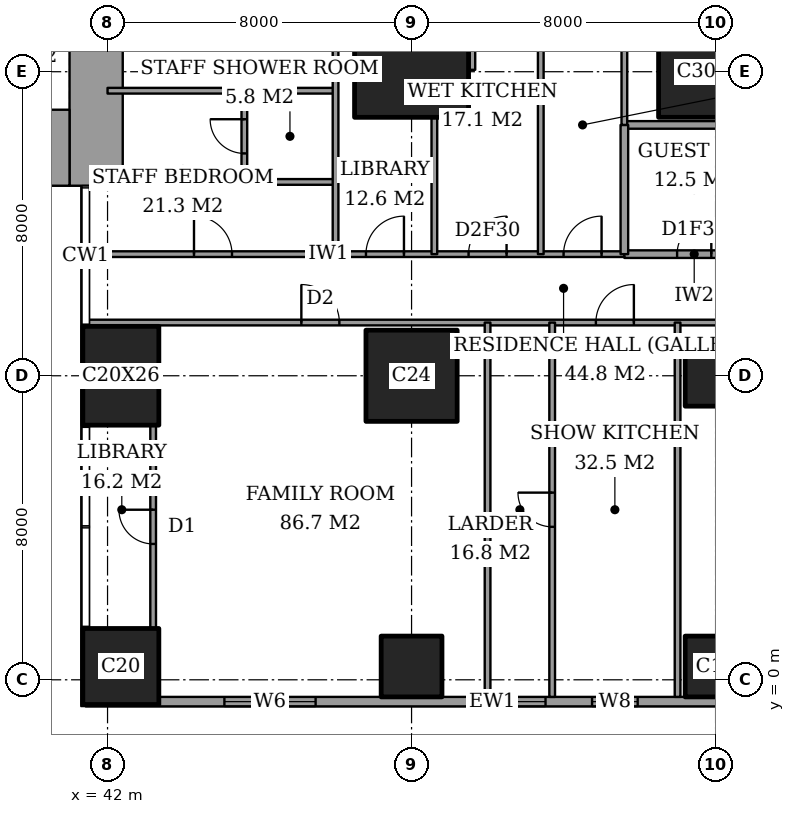
"""IFC4 building model, lengths in metres.
Left out: names, types, materials, properties, quantities, classifications, styles, units other than length and angle.
Written with IfcOpenShell. Run it as: python <this file> out.ifc"""

import sys

from ifc_helpers import new_model, si_unit, direction, frame, frame_2d, origin, origin_2d, place, context, subcontext, project, spatial, rectangle, extrude, element, fill, save


model = new_model("IFC4")
c1 = context("Model", 3, precision=1e-05, world=origin(), true_north=direction((0.0, 1.0)))
c2 = subcontext(c1, "Body", "Model", "MODEL_VIEW")
j1 = project(units=[si_unit("LENGTHUNIT", "METRE"), si_unit("PLANEANGLEUNIT", "RADIAN")], contexts=[c1])
p1 = place(None, origin())
s1 = spatial("IfcSite", under=j1, at=p1, CompositionType="ELEMENT")
p2 = place(p1, origin())
s2 = spatial("IfcBuilding", under=s1, at=p2, CompositionType="ELEMENT")
p3 = place(p2, frame((0.0, 0.0, 255.6)))
s3 = spatial("IfcBuildingStorey", under=s2, at=p3, CompositionType="ELEMENT", Elevation=255.6)
p4 = place(p3, frame((42.35, 0.35, 0.0), z_axis=(0.0, 0.0, 1.0), x_axis=(1.0, 0.0, 0.0)))
e1 = element("IfcColumn", 1, at=p4, inside=s3, PredefinedType="COLUMN", context=c2, shape_type="SweptSolid", body=[
    extrude(rectangle(XDim=2.0, YDim=2.0, at=origin_2d()), origin(), (0.0, 0.0, 1.0), 3.6),
])
p5 = place(p3, frame((42.35, 8.0, 0.0), z_axis=(0.0, 0.0, 1.0), x_axis=(1.0, 0.0, 0.0)))
e2 = element("IfcColumn", 2, at=p5, inside=s3, PredefinedType="COLUMN", context=c2, shape_type="SweptSolid", body=[
    extrude(rectangle(XDim=2.0, YDim=2.6, at=origin_2d()), origin(), (0.0, 0.0, 1.0), 3.6),
])
p6 = place(p3, frame((50.0, 0.35, 0.0), z_axis=(0.0, 0.0, 1.0), x_axis=(1.0, 0.0, 0.0)))
e3 = element("IfcColumn", 3, at=p6, inside=s3, PredefinedType="COLUMN", context=c2, shape_type="SweptSolid", body=[
    extrude(rectangle(XDim=1.6, YDim=1.6, at=origin_2d()), origin(), (0.0, 0.0, 1.0), 3.6),
])
p7 = place(p3, frame((50.0, 8.0, 0.0), z_axis=(0.0, 0.0, 1.0), x_axis=(1.0, 0.0, 0.0)))
e4 = element("IfcColumn", 4, at=p7, inside=s3, PredefinedType="COLUMN", context=c2, shape_type="SweptSolid", body=[
    extrude(rectangle(XDim=2.4, YDim=2.4, at=origin_2d()), origin(), (0.0, 0.0, 1.0), 3.6),
])
p8 = place(p3, frame((50.0, 16.0, 0.0), z_axis=(0.0, 0.0, 1.0), x_axis=(1.0, 0.0, 0.0)))
e5 = element("IfcColumn", 5, at=p8, inside=s3, PredefinedType="COLUMN", context=c2, shape_type="SweptSolid", body=[
    extrude(rectangle(XDim=3.0, YDim=2.4, at=origin_2d()), origin(), (0.0, 0.0, 1.0), 3.6),
])
for number, where, z_axis, x_axis in (
    (6, (58.0, 0.35, 0.0), (0.0, 0.0, 1.0), (1.0, 0.0, 0.0)),
    (7, (58.0, 8.0, 0.0), (0.0, 0.0, 1.0), (1.0, 0.0, 0.0)),
):
    element("IfcColumn", number, at=place(p3, frame(where, z_axis=z_axis, x_axis=x_axis)), inside=s3, PredefinedType="COLUMN", context=c2, shape_type="SweptSolid", body=[
        extrude(rectangle(XDim=1.6, YDim=1.6, at=origin_2d()), origin(), (0.0, 0.0, 1.0), 3.6),
    ])
p9 = place(p3, frame((58.0, 16.0, 0.0), z_axis=(0.0, 0.0, 1.0), x_axis=(1.0, 0.0, 0.0)))
e8 = element("IfcColumn", 8, at=p9, inside=s3, PredefinedType="COLUMN", context=c2, shape_type="SweptSolid", body=[
    extrude(rectangle(XDim=3.0, YDim=2.4, at=origin_2d()), origin(), (0.0, 0.0, 1.0), 3.6),
])
p10 = place(p3, frame((37.85, 14.0, 0.0), z_axis=(0.0, 0.0, 1.0), x_axis=(1.0, 0.0, 0.0)))
e9 = element("IfcWall", 9, at=p10, inside=s3, PredefinedType="SHEAR", context=c2, shape_type="SweptSolid", body=[
    extrude(rectangle(XDim=3.15, YDim=2.0, at=frame_2d((1.575, 0.0))), origin(), (0.0, 0.0, 1.0), 3.6),
])
p11 = place(p3, frame((41.7, 13.0, 0.0), z_axis=(0.0, 0.0, 1.0), x_axis=(0.0, 1.0, 0.0)))
e10 = element("IfcWall", 10, at=p11, inside=s3, PredefinedType="SHEAR", context=c2, shape_type="SweptSolid", body=[
    extrude(rectangle(XDim=11.85, YDim=1.4, at=frame_2d((5.925, 0.0))), origin(), (0.0, 0.0, 1.0), 3.6),
])
p12 = place(p11, frame((7.5, 0.0, 0.0)))
e11 = element("IfcOpeningElement", 11, at=p12, cuts=e10, PredefinedType="OPENING", context=c2, shape_type="SweptSolid", body=[
    extrude(rectangle(XDim=1.8, YDim=2.4, at=frame_2d((0.9, 1.2))), frame((0.0, 0.71, 0.0), z_axis=(0.0, -1.0, 0.0), x_axis=(1.0, 0.0, 0.0)), (0.0, 0.0, 1.0), 1.42),
])
p13 = place(p3, frame((41.425, -0.575, 0.0), z_axis=(0.0, 0.0, 1.0), x_axis=(1.0, 0.0, 0.0)))
e12 = element("IfcWall", 12, at=p13, inside=s3, PredefinedType="SOLIDWALL", context=c2, shape_type="SweptSolid", body=[
    extrude(rectangle(XDim=21.4, YDim=0.25, at=frame_2d((10.7, 0.0))), origin(), (0.0, 0.0, 1.0), 3.6),
])
p14 = place(p13, frame((3.65, 0.0, 0.6)))
e13 = element("IfcOpeningElement", 13, at=p14, cuts=e12, PredefinedType="OPENING", context=c2, shape_type="SweptSolid", body=[
    extrude(rectangle(XDim=2.4, YDim=2.0, at=frame_2d((1.2, 1.0))), frame((0.0, 0.135, 0.0), z_axis=(0.0, -1.0, 0.0), x_axis=(1.0, 0.0, 0.0)), (0.0, 0.0, 1.0), 0.27),
])
p15 = place(p13, frame((10.9, 0.0, 0.6)))
e14 = element("IfcOpeningElement", 14, at=p15, cuts=e12, PredefinedType="OPENING", context=c2, shape_type="SweptSolid", body=[
    extrude(rectangle(XDim=1.2, YDim=2.0, at=frame_2d((0.6, 1.0))), frame((0.0, 0.135, 0.0), z_axis=(0.0, -1.0, 0.0), x_axis=(1.0, 0.0, 0.0)), (0.0, 0.0, 1.0), 0.27),
])
p16 = place(p13, frame((13.325, 0.0, 0.6)))
e15 = element("IfcOpeningElement", 15, at=p16, cuts=e12, PredefinedType="OPENING", context=c2, shape_type="SweptSolid", body=[
    extrude(rectangle(XDim=1.2, YDim=2.0, at=frame_2d((0.6, 1.0))), frame((0.0, 0.135, 0.0), z_axis=(0.0, -1.0, 0.0), x_axis=(1.0, 0.0, 0.0)), (0.0, 0.0, 1.0), 0.27),
])
p17 = place(p13, frame((18.125, 0.0, 0.6)))
e16 = element("IfcOpeningElement", 16, at=p17, cuts=e12, PredefinedType="OPENING", context=c2, shape_type="SweptSolid", body=[
    extrude(rectangle(XDim=2.4, YDim=2.0, at=frame_2d((1.2, 1.0))), frame((0.0, 0.135, 0.0), z_axis=(0.0, -1.0, 0.0), x_axis=(1.0, 0.0, 0.0)), (0.0, 0.0, 1.0), 0.27),
])
p18 = place(p3, frame((41.439, 9.4, 0.0), z_axis=(0.0, 0.0, 1.0), x_axis=(1.0, 0.0, 0.0)))
e17 = element("IfcWall", 17, at=p18, inside=s3, PredefinedType="PARTITIONING", context=c2, shape_type="SweptSolid", body=[
    extrude(rectangle(XDim=25.011, YDim=0.15, at=frame_2d((12.505, 0.0))), origin(), (0.0, 0.0, 1.0), 3.35),
])
p19 = place(p18, frame((19.786, 0.0, 0.0)))
e18 = element("IfcOpeningElement", 18, at=p19, cuts=e17, PredefinedType="OPENING", context=c2, shape_type="SweptSolid", body=[
    extrude(rectangle(XDim=1.0, YDim=2.1, at=frame_2d((0.5, 1.05))), frame((0.0, 0.085, 0.0), z_axis=(0.0, -1.0, 0.0), x_axis=(1.0, 0.0, 0.0)), (0.0, 0.0, 1.0), 0.17),
])
p20 = place(p18, frame((13.411, 0.0, 0.0)))
e19 = element("IfcOpeningElement", 19, at=p20, cuts=e17, PredefinedType="OPENING", context=c2, shape_type="SweptSolid", body=[
    extrude(rectangle(XDim=1.0, YDim=2.1, at=frame_2d((0.5, 1.05))), frame((0.0, 0.085, 0.0), z_axis=(0.0, -1.0, 0.0), x_axis=(1.0, 0.0, 0.0)), (0.0, 0.0, 1.0), 0.17),
])
p21 = place(p18, frame((5.661, 0.0, 0.0)))
e20 = element("IfcOpeningElement", 20, at=p21, cuts=e17, PredefinedType="OPENING", context=c2, shape_type="SweptSolid", body=[
    extrude(rectangle(XDim=1.0, YDim=2.1, at=frame_2d((0.5, 1.05))), frame((0.0, 0.085, 0.0), z_axis=(0.0, -1.0, 0.0), x_axis=(1.0, 0.0, 0.0)), (0.0, 0.0, 1.0), 0.17),
])
p22 = place(p3, frame((55.6, 11.2, 0.0), z_axis=(0.0, 0.0, 1.0), x_axis=(1.0, 0.0, 0.0)))
e21 = element("IfcWall", 21, at=p22, inside=s3, PredefinedType="PARTITIONING", context=c2, shape_type="SweptSolid", body=[
    extrude(rectangle(XDim=3.675, YDim=0.2, at=frame_2d((1.837, 0.0))), origin(), (0.0, 0.0, 1.0), 3.35),
])
p23 = place(p22, frame((1.387, 0.0, 0.0)))
e22 = element("IfcOpeningElement", 22, at=p23, cuts=e21, PredefinedType="OPENING", context=c2, shape_type="SweptSolid", body=[
    extrude(rectangle(XDim=0.9, YDim=2.1, at=frame_2d((0.45, 1.05))), frame((0.0, 0.11, 0.0), z_axis=(0.0, -1.0, 0.0), x_axis=(1.0, 0.0, 0.0)), (0.0, 0.0, 1.0), 0.22),
])
p24 = place(p3, frame((41.439, 11.2, 0.0), z_axis=(0.0, 0.0, 1.0), x_axis=(1.0, 0.0, 0.0)))
e23 = element("IfcWall", 23, at=p24, inside=s3, PredefinedType="PARTITIONING", context=c2, shape_type="SweptSolid", body=[
    extrude(rectangle(XDim=14.161, YDim=0.15, at=frame_2d((7.081, 0.0))), origin(), (0.0, 0.0, 1.0), 3.35),
])
p25 = place(p24, frame((12.561, 0.0, 0.0)))
e24 = element("IfcOpeningElement", 24, at=p25, cuts=e23, PredefinedType="OPENING", context=c2, shape_type="SweptSolid", body=[
    extrude(rectangle(XDim=1.0, YDim=2.1, at=frame_2d((0.5, 1.05))), frame((0.0, 0.085, 0.0), z_axis=(0.0, -1.0, 0.0), x_axis=(1.0, 0.0, 0.0)), (0.0, 0.0, 1.0), 0.17),
])
p26 = place(p24, frame((10.061, 0.0, 0.0)))
e25 = element("IfcOpeningElement", 25, at=p26, cuts=e23, PredefinedType="OPENING", context=c2, shape_type="SweptSolid", body=[
    extrude(rectangle(XDim=1.0, YDim=2.1, at=frame_2d((0.5, 1.05))), frame((0.0, 0.085, 0.0), z_axis=(0.0, -1.0, 0.0), x_axis=(1.0, 0.0, 0.0)), (0.0, 0.0, 1.0), 0.17),
])
p27 = place(p24, frame((7.361, 0.0, 0.0)))
e26 = element("IfcOpeningElement", 26, at=p27, cuts=e23, PredefinedType="OPENING", context=c2, shape_type="SweptSolid", body=[
    extrude(rectangle(XDim=1.0, YDim=2.1, at=frame_2d((0.5, 1.05))), frame((0.0, 0.085, 0.0), z_axis=(0.0, -1.0, 0.0), x_axis=(1.0, 0.0, 0.0)), (0.0, 0.0, 1.0), 0.17),
])
p28 = place(p24, frame((2.836, 0.0, 0.0)))
e27 = element("IfcOpeningElement", 27, at=p28, cuts=e23, PredefinedType="OPENING", context=c2, shape_type="SweptSolid", body=[
    extrude(rectangle(XDim=1.0, YDim=2.1, at=frame_2d((0.5, 1.05))), frame((0.0, 0.085, 0.0), z_axis=(0.0, -1.0, 0.0), x_axis=(1.0, 0.0, 0.0)), (0.0, 0.0, 1.0), 0.17),
])
p29 = place(p3, frame((45.6, 13.1, 0.0), z_axis=(0.0, 0.0, 1.0), x_axis=(1.0, 0.0, 0.0)))
e28 = element("IfcWall", 28, at=p29, inside=s3, PredefinedType="PARTITIONING", context=c2, shape_type="SweptSolid", body=[
    extrude(rectangle(XDim=2.4, YDim=0.15, at=frame_2d((1.2, 0.0))), origin(), (0.0, 0.0, 1.0), 3.35),
])
p30 = place(p3, frame((55.6, 14.6, 0.0), z_axis=(0.0, 0.0, 1.0), x_axis=(1.0, 0.0, 0.0)))
e29 = element("IfcWall", 29, at=p30, inside=s3, PredefinedType="PARTITIONING", context=c2, shape_type="SweptSolid", body=[
    extrude(rectangle(XDim=3.675, YDim=0.2, at=frame_2d((1.837, 0.0))), origin(), (0.0, 0.0, 1.0), 3.35),
])
p31 = place(p3, frame((42.0, 15.5, 0.0), z_axis=(0.0, 0.0, 1.0), x_axis=(1.0, 0.0, 0.0)))
e30 = element("IfcWall", 30, at=p31, inside=s3, PredefinedType="PARTITIONING", context=c2, shape_type="SweptSolid", body=[
    extrude(rectangle(XDim=6.0, YDim=0.15, at=frame_2d((3.0, 0.0))), origin(), (0.0, 0.0, 1.0), 3.35),
])
p32 = place(p3, frame((48.0, 16.05, 0.0), z_axis=(0.0, 0.0, 1.0), x_axis=(1.0, 0.0, 0.0)))
e31 = element("IfcWall", 31, at=p32, inside=s3, PredefinedType="PARTITIONING", context=c2, shape_type="SweptSolid", body=[
    extrude(rectangle(XDim=0.5, YDim=0.15, at=frame_2d((0.25, 0.0))), origin(), (0.0, 0.0, 1.0), 2.634),
])
p33 = place(p3, frame((43.2, 1.35, 0.0), z_axis=(0.0, 0.0, 1.0), x_axis=(0.0, 1.0, 0.0)))
e32 = element("IfcWall", 32, at=p33, inside=s3, PredefinedType="PARTITIONING", context=c2, shape_type="SweptSolid", body=[
    extrude(rectangle(XDim=5.35, YDim=0.15, at=frame_2d((2.675, 0.0))), origin(), (0.0, 0.0, 1.0), 3.35),
])
p34 = place(p33, frame((2.225, 0.0, 0.0)))
e33 = element("IfcOpeningElement", 33, at=p34, cuts=e32, PredefinedType="OPENING", context=c2, shape_type="SweptSolid", body=[
    extrude(rectangle(XDim=0.9, YDim=2.1, at=frame_2d((0.45, 1.05))), frame((0.0, 0.085, 0.0), z_axis=(0.0, -1.0, 0.0), x_axis=(1.0, 0.0, 0.0)), (0.0, 0.0, 1.0), 0.17),
])
p35 = place(p3, frame((45.6, 13.1, 0.0), z_axis=(0.0, 0.0, 1.0), x_axis=(0.0, 1.0, 0.0)))
e34 = element("IfcWall", 34, at=p35, inside=s3, PredefinedType="PARTITIONING", context=c2, shape_type="SweptSolid", body=[
    extrude(rectangle(XDim=2.4, YDim=0.15, at=frame_2d((1.2, 0.0))), origin(), (0.0, 0.0, 1.0), 3.35),
])
p36 = place(p35, frame((0.75, 0.0, 0.0)))
e35 = element("IfcOpeningElement", 35, at=p36, cuts=e34, PredefinedType="OPENING", context=c2, shape_type="SweptSolid", body=[
    extrude(rectangle(XDim=0.9, YDim=2.1, at=frame_2d((0.45, 1.05))), frame((0.0, 0.085, 0.0), z_axis=(0.0, -1.0, 0.0), x_axis=(1.0, 0.0, 0.0)), (0.0, 0.0, 1.0), 0.17),
])
p37 = place(p3, frame((48.0, 11.2, 0.0), z_axis=(0.0, 0.0, 1.0), x_axis=(0.0, 1.0, 0.0)))
e36 = element("IfcWall", 36, at=p37, inside=s3, PredefinedType="PARTITIONING", context=c2, shape_type="SweptSolid", body=[
    extrude(rectangle(XDim=6.8, YDim=0.15, at=frame_2d((3.4, 0.0))), origin(), (0.0, 0.0, 1.0), 3.35),
])
p38 = place(p3, frame((50.6, 11.2, 0.0), z_axis=(0.0, 0.0, 1.0), x_axis=(0.0, 1.0, 0.0)))
e37 = element("IfcWall", 37, at=p38, inside=s3, PredefinedType="PARTITIONING", context=c2, shape_type="SweptSolid", body=[
    extrude(rectangle(XDim=3.6, YDim=0.15, at=frame_2d((1.8, 0.0))), origin(), (0.0, 0.0, 1.0), 3.35),
])
p39 = place(p3, frame((51.6, 16.05, 0.0), z_axis=(0.0, 0.0, 1.0), x_axis=(0.0, 1.0, 0.0)))
e38 = element("IfcWall", 38, at=p39, inside=s3, PredefinedType="PARTITIONING", context=c2, shape_type="SweptSolid", body=[
    extrude(rectangle(XDim=1.95, YDim=0.15, at=frame_2d((0.975, 0.0))), origin(), (0.0, 0.0, 1.0), 3.35),
])
p40 = place(p3, frame((52.0, -0.45, 0.0), z_axis=(0.0, 0.0, 1.0), x_axis=(0.0, 1.0, 0.0)))
e39 = element("IfcWall", 39, at=p40, inside=s3, PredefinedType="PARTITIONING", context=c2, shape_type="SweptSolid", body=[
    extrude(rectangle(XDim=9.85, YDim=0.15, at=frame_2d((4.925, 0.0))), origin(), (0.0, 0.0, 1.0), 3.35),
])
p41 = place(p3, frame((53.4, 11.2, 0.0), z_axis=(0.0, 0.0, 1.0), x_axis=(0.0, 1.0, 0.0)))
e40 = element("IfcWall", 40, at=p41, inside=s3, PredefinedType="PARTITIONING", context=c2, shape_type="SweptSolid", body=[
    extrude(rectangle(XDim=6.8, YDim=0.15, at=frame_2d((3.4, 0.0))), origin(), (0.0, 0.0, 1.0), 3.35),
])
p42 = place(p3, frame((53.7, -0.45, 0.0), z_axis=(0.0, 0.0, 1.0), x_axis=(0.0, 1.0, 0.0)))
e41 = element("IfcWall", 41, at=p42, inside=s3, PredefinedType="PARTITIONING", context=c2, shape_type="SweptSolid", body=[
    extrude(rectangle(XDim=9.85, YDim=0.15, at=frame_2d((4.925, 0.0))), origin(), (0.0, 0.0, 1.0), 3.35),
])
p43 = place(p42, frame((4.475, 0.0, 0.0)))
e42 = element("IfcOpeningElement", 42, at=p43, cuts=e41, PredefinedType="OPENING", context=c2, shape_type="SweptSolid", body=[
    extrude(rectangle(XDim=0.9, YDim=2.1, at=frame_2d((0.45, 1.05))), frame((0.0, 0.085, 0.0), z_axis=(0.0, -1.0, 0.0), x_axis=(1.0, 0.0, 0.0)), (0.0, 0.0, 1.0), 0.17),
])
p44 = place(p3, frame((55.6, 11.2, 0.0), z_axis=(0.0, 0.0, 1.0), x_axis=(0.0, 1.0, 0.0)))
e43 = element("IfcWall", 43, at=p44, inside=s3, PredefinedType="PARTITIONING", context=c2, shape_type="SweptSolid", body=[
    extrude(rectangle(XDim=3.4, YDim=0.2, at=frame_2d((1.7, 0.0))), origin(), (0.0, 0.0, 1.0), 3.35),
])
p45 = place(p3, frame((55.6, 14.6, 0.0), z_axis=(0.0, 0.0, 1.0), x_axis=(0.0, 1.0, 0.0)))
e44 = element("IfcWall", 44, at=p45, inside=s3, PredefinedType="PARTITIONING", context=c2, shape_type="SweptSolid", body=[
    extrude(rectangle(XDim=7.0, YDim=0.15, at=frame_2d((3.5, 0.0))), origin(), (0.0, 0.0, 1.0), 3.35),
])
p46 = place(p45, frame((4.7, 0.0, 0.0)))
e45 = element("IfcOpeningElement", 45, at=p46, cuts=e44, PredefinedType="OPENING", context=c2, shape_type="SweptSolid", body=[
    extrude(rectangle(XDim=1.0, YDim=2.1, at=frame_2d((0.5, 1.05))), frame((0.0, 0.085, 0.0), z_axis=(0.0, -1.0, 0.0), x_axis=(1.0, 0.0, 0.0)), (0.0, 0.0, 1.0), 0.17),
])
p47 = place(p3, frame((57.0, -0.45, 0.0), z_axis=(0.0, 0.0, 1.0), x_axis=(0.0, 1.0, 0.0)))
e46 = element("IfcWall", 46, at=p47, inside=s3, PredefinedType="PARTITIONING", context=c2, shape_type="SweptSolid", body=[
    extrude(rectangle(XDim=9.85, YDim=0.15, at=frame_2d((4.925, 0.0))), origin(), (0.0, 0.0, 1.0), 3.35),
])
p48 = place(p14, origin())
e47 = element("IfcWindow", 47, at=p48, inside=s3, PartitioningType="SINGLE_PANEL", PredefinedType="WINDOW", context=c2, shape_type="SweptSolid", body=[
    extrude(rectangle(XDim=2.4, YDim=2.0, at=frame_2d((1.2, 1.0))), frame((0.0, 0.03, 0.0), z_axis=(0.0, -1.0, 0.0), x_axis=(1.0, 0.0, 0.0)), (0.0, 0.0, 1.0), 0.06),
])
fill(e13, e47)
p49 = place(p15, origin())
e48 = element("IfcWindow", 48, at=p49, inside=s3, PartitioningType="SINGLE_PANEL", PredefinedType="WINDOW", context=c2, shape_type="SweptSolid", body=[
    extrude(rectangle(XDim=1.2, YDim=2.0, at=frame_2d((0.6, 1.0))), frame((0.0, 0.03, 0.0), z_axis=(0.0, -1.0, 0.0), x_axis=(1.0, 0.0, 0.0)), (0.0, 0.0, 1.0), 0.06),
])
fill(e14, e48)
p50 = place(p16, origin())
e49 = element("IfcWindow", 49, at=p50, inside=s3, PartitioningType="SINGLE_PANEL", PredefinedType="WINDOW", context=c2, shape_type="SweptSolid", body=[
    extrude(rectangle(XDim=1.2, YDim=2.0, at=frame_2d((0.6, 1.0))), frame((0.0, 0.03, 0.0), z_axis=(0.0, -1.0, 0.0), x_axis=(1.0, 0.0, 0.0)), (0.0, 0.0, 1.0), 0.06),
])
fill(e15, e49)
p51 = place(p20, origin())
e50 = element("IfcDoor", 50, at=p51, inside=s3, OperationType="SINGLE_SWING_LEFT", PredefinedType="DOOR", context=c2, shape_type="SweptSolid", body=[
    extrude(rectangle(XDim=1.0, YDim=2.1, at=frame_2d((0.5, 1.05))), frame((0.0, 0.025, 0.0), z_axis=(0.0, -1.0, 0.0), x_axis=(1.0, 0.0, 0.0)), (0.0, 0.0, 1.0), 0.05),
])
fill(e19, e50)
p52 = place(p43, origin())
e51 = element("IfcDoor", 51, at=p52, inside=s3, OperationType="SINGLE_SWING_LEFT", PredefinedType="DOOR", context=c2, shape_type="SweptSolid", body=[
    extrude(rectangle(XDim=0.9, YDim=2.1, at=frame_2d((0.45, 1.05))), frame((0.0, 0.025, 0.0), z_axis=(0.0, -1.0, 0.0), x_axis=(1.0, 0.0, 0.0)), (0.0, 0.0, 1.0), 0.05),
])
fill(e42, e51)
p53 = place(p21, origin())
e52 = element("IfcDoor", 52, at=p53, inside=s3, OperationType="SINGLE_SWING_RIGHT", PredefinedType="DOOR", context=c2, shape_type="SweptSolid", body=[
    extrude(rectangle(XDim=1.0, YDim=2.1, at=frame_2d((0.5, 1.05))), frame((0.0, 0.025, 0.0), z_axis=(0.0, -1.0, 0.0), x_axis=(1.0, 0.0, 0.0)), (0.0, 0.0, 1.0), 0.05),
])
fill(e20, e52)
p54 = place(p34, origin())
e53 = element("IfcDoor", 53, at=p54, inside=s3, OperationType="SINGLE_SWING_LEFT", PredefinedType="DOOR", context=c2, shape_type="SweptSolid", body=[
    extrude(rectangle(XDim=0.9, YDim=2.1, at=frame_2d((0.45, 1.05))), frame((0.0, 0.025, 0.0), z_axis=(0.0, -1.0, 0.0), x_axis=(1.0, 0.0, 0.0)), (0.0, 0.0, 1.0), 0.05),
])
fill(e33, e53)
p55 = place(p25, origin())
e54 = element("IfcDoor", 54, at=p55, inside=s3, OperationType="SINGLE_SWING_LEFT", PredefinedType="DOOR", context=c2, shape_type="SweptSolid", body=[
    extrude(rectangle(XDim=1.0, YDim=2.1, at=frame_2d((0.5, 1.05))), frame((0.0, 0.025, 0.0), z_axis=(0.0, -1.0, 0.0), x_axis=(1.0, 0.0, 0.0)), (0.0, 0.0, 1.0), 0.05),
])
fill(e24, e54)
p56 = place(p23, origin())
e55 = element("IfcDoor", 55, at=p56, inside=s3, OperationType="SINGLE_SWING_LEFT", PredefinedType="DOOR", context=c2, shape_type="SweptSolid", body=[
    extrude(rectangle(XDim=0.9, YDim=2.1, at=frame_2d((0.45, 1.05))), frame((0.0, 0.025, 0.0), z_axis=(0.0, -1.0, 0.0), x_axis=(1.0, 0.0, 0.0)), (0.0, 0.0, 1.0), 0.05),
])
fill(e22, e55)
p57 = place(p26, origin())
e56 = element("IfcDoor", 56, at=p57, inside=s3, OperationType="SINGLE_SWING_LEFT", PredefinedType="DOOR", context=c2, shape_type="SweptSolid", body=[
    extrude(rectangle(XDim=1.0, YDim=2.1, at=frame_2d((0.5, 1.05))), frame((0.0, 0.025, 0.0), z_axis=(0.0, -1.0, 0.0), x_axis=(1.0, 0.0, 0.0)), (0.0, 0.0, 1.0), 0.05),
])
fill(e25, e56)
p58 = place(p27, origin())
e57 = element("IfcDoor", 57, at=p58, inside=s3, OperationType="SINGLE_SWING_LEFT", PredefinedType="DOOR", context=c2, shape_type="SweptSolid", body=[
    extrude(rectangle(XDim=1.0, YDim=2.1, at=frame_2d((0.5, 1.05))), frame((0.0, 0.025, 0.0), z_axis=(0.0, -1.0, 0.0), x_axis=(1.0, 0.0, 0.0)), (0.0, 0.0, 1.0), 0.05),
])
fill(e26, e57)
p59 = place(p36, origin())
e58 = element("IfcDoor", 58, at=p59, inside=s3, OperationType="SINGLE_SWING_LEFT", PredefinedType="DOOR", context=c2, shape_type="SweptSolid", body=[
    extrude(rectangle(XDim=0.9, YDim=2.1, at=frame_2d((0.45, 1.05))), frame((0.0, 0.025, 0.0), z_axis=(0.0, -1.0, 0.0), x_axis=(1.0, 0.0, 0.0)), (0.0, 0.0, 1.0), 0.05),
])
fill(e35, e58)
p60 = place(p28, origin())
e59 = element("IfcDoor", 59, at=p60, inside=s3, OperationType="SINGLE_SWING_RIGHT", PredefinedType="DOOR", context=c2, shape_type="SweptSolid", body=[
    extrude(rectangle(XDim=1.0, YDim=2.1, at=frame_2d((0.5, 1.05))), frame((0.0, 0.025, 0.0), z_axis=(0.0, -1.0, 0.0), x_axis=(1.0, 0.0, 0.0)), (0.0, 0.0, 1.0), 0.05),
])
fill(e27, e59)
save(model, sys.argv[1])
